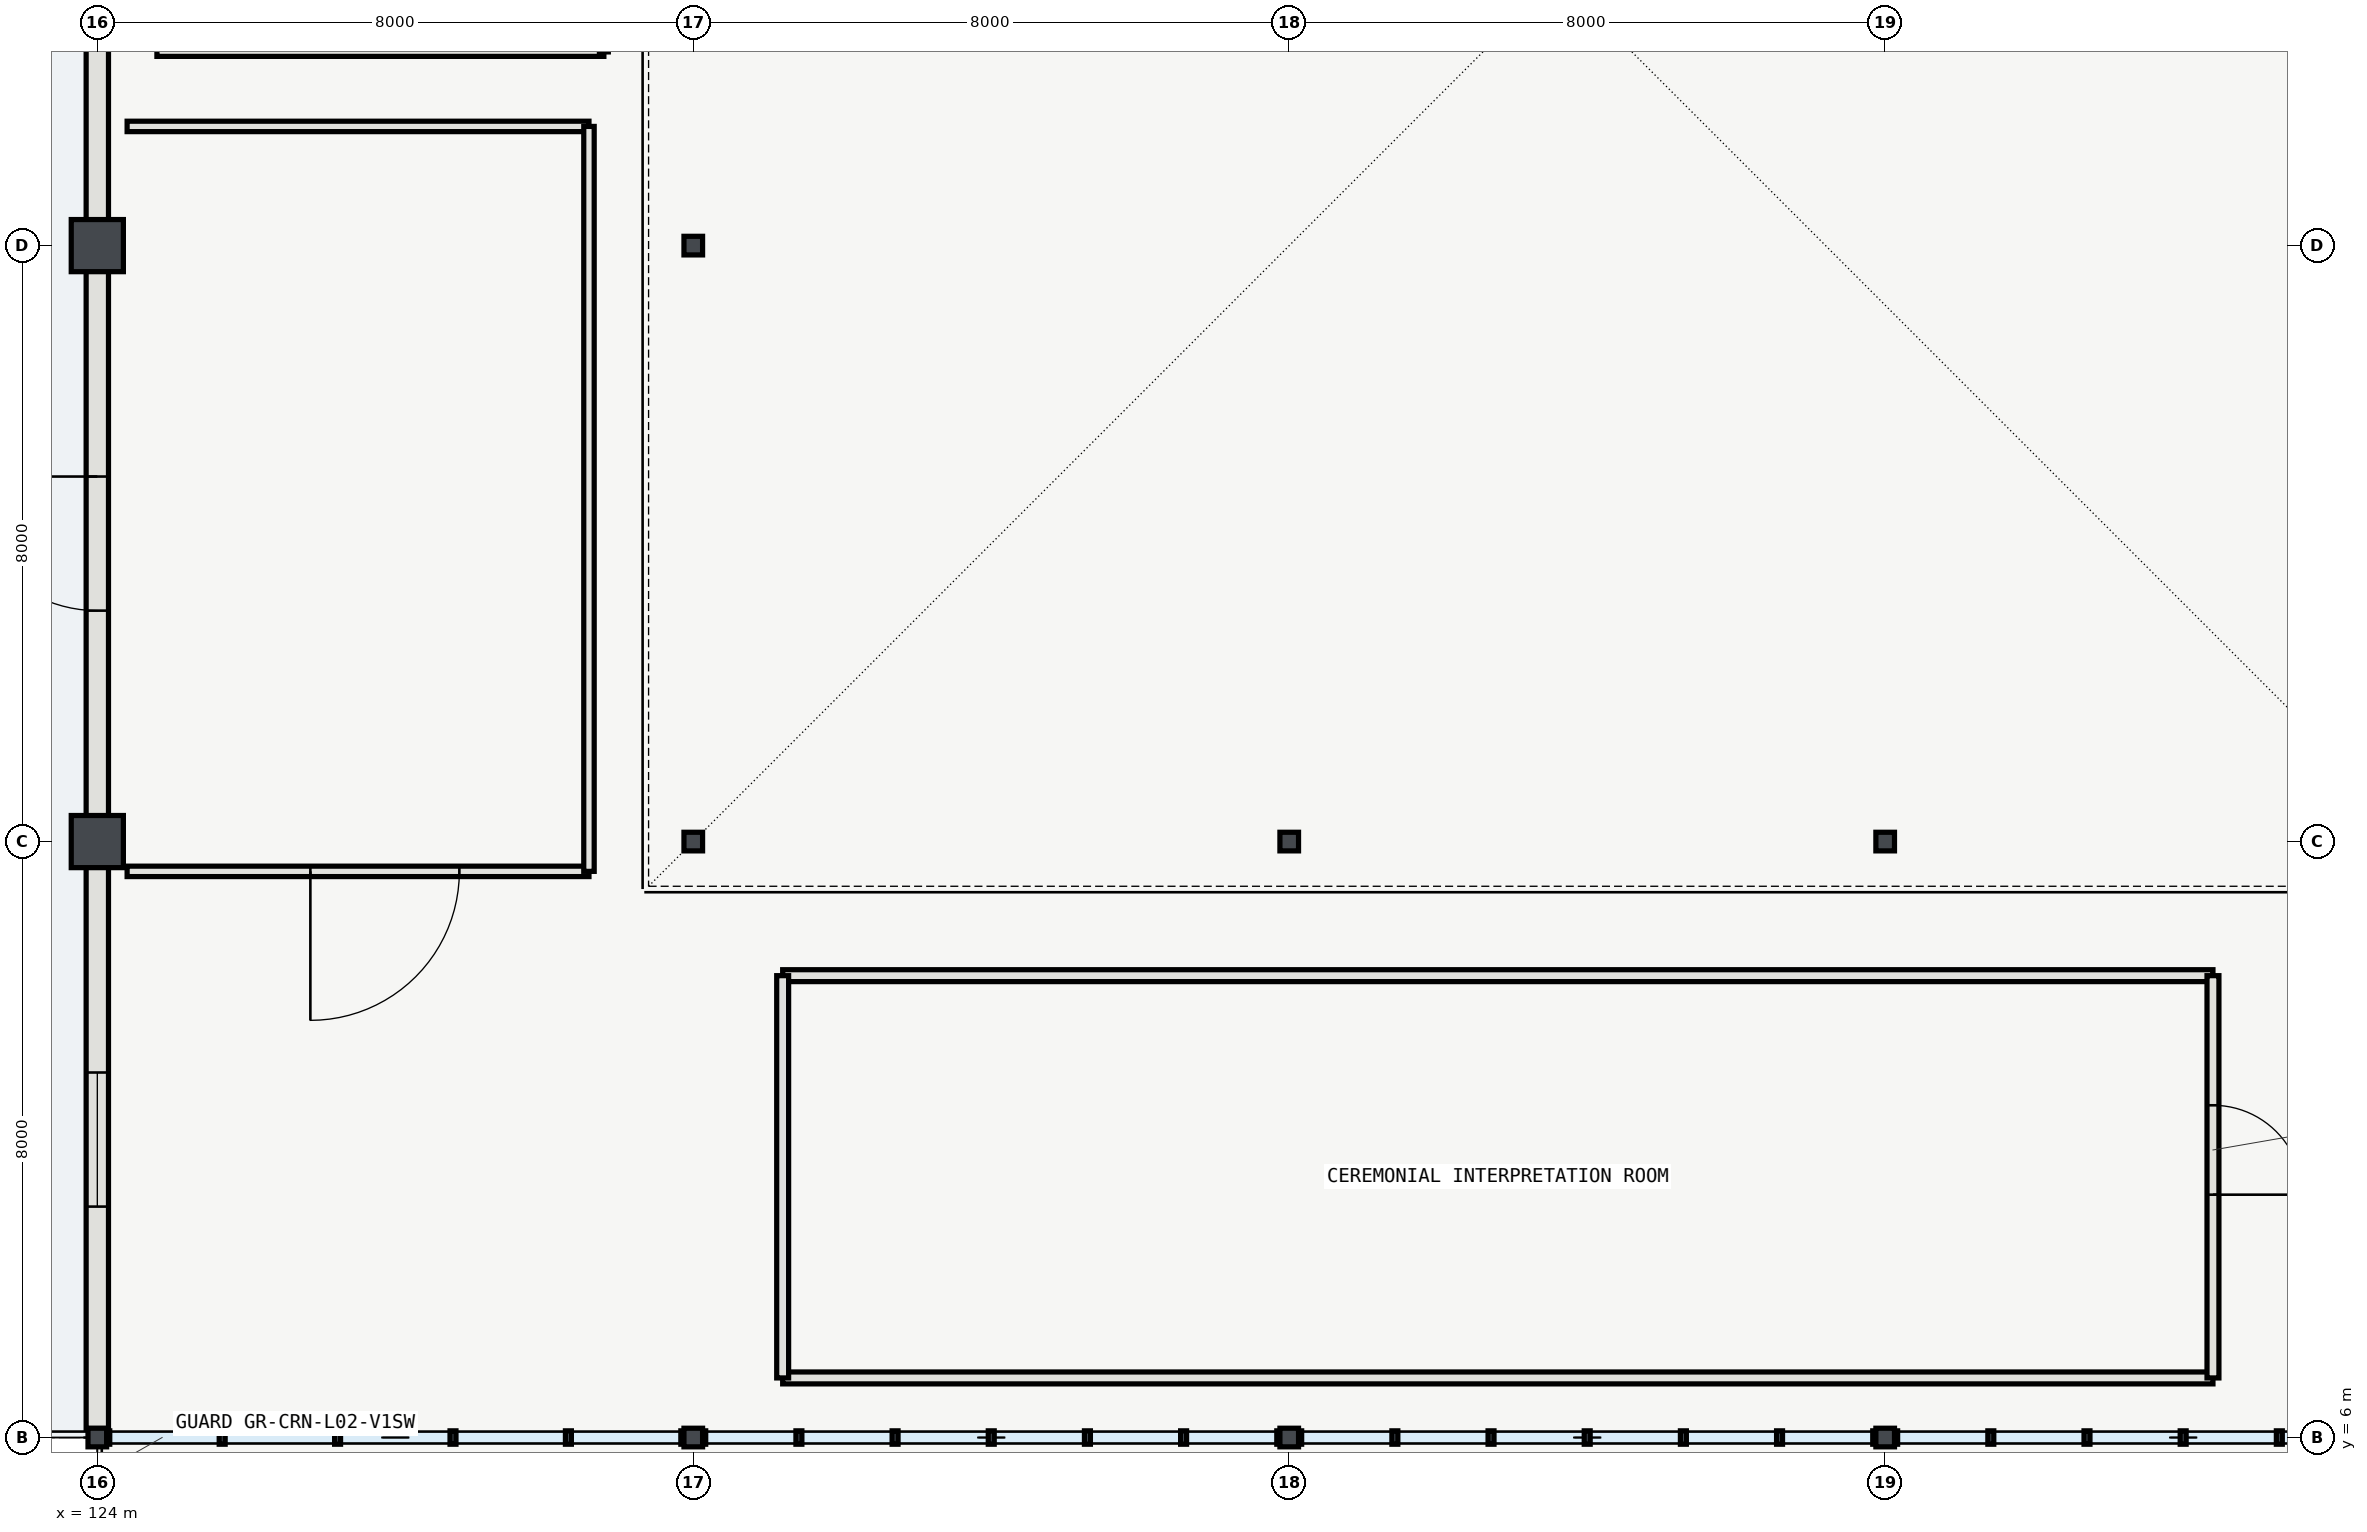
"""IFC4 building model, lengths in metres.
Left out: names, types, materials, properties, quantities, classifications, styles, units other than length and angle.
Written with IfcOpenShell. Run it as: python <this file> out.ifc"""

import sys

from ifc_helpers import new_model, si_unit, direction, frame, frame_2d, origin, origin_2d, place, context, subcontext, project, spatial, rectangle, i_section, extrude, element, fill, save


model = new_model("IFC4")
c1 = context("Model", 3, precision=1e-05, world=origin(), true_north=direction((0.0, 1.0)))
c2 = subcontext(c1, "Body", "Model", "MODEL_VIEW")
j1 = project(units=[si_unit("LENGTHUNIT", "METRE"), si_unit("PLANEANGLEUNIT", "RADIAN")], contexts=[c1])
p1 = place(None, origin())
s1 = spatial("IfcSite", under=j1, at=p1, CompositionType="ELEMENT")
p2 = place(p1, origin())
s2 = spatial("IfcBuilding", under=s1, at=p2, CompositionType="ELEMENT")
p3 = place(p2, frame((0.0, 0.0, 10.8)))
s3 = spatial("IfcBuildingStorey", under=s2, at=p3, CompositionType="ELEMENT", Elevation=10.8)
p4 = place(p3, frame((124.0, 6.0, 0.0), z_axis=(0.0, 0.0, 1.0), x_axis=(1.0, 0.0, 0.0)))
e1 = element("IfcColumn", 1, at=p4, inside=s3, PredefinedType="COLUMN", context=c2, shape_type="SweptSolid", body=[
    extrude(i_section(OverallWidth=0.25, OverallDepth=0.25, WebThickness=0.009, FlangeThickness=0.014, FilletRadius=0.016, at=origin_2d()), origin(), (0.0, 0.0, 1.0), 5.4),
])
for number, where, z_axis, x_axis in (
    (2, (124.0, 14.0, 0.0), (0.0, 0.0, 1.0), (1.0, 0.0, 0.0)),
    (3, (124.0, 22.0, 0.0), (0.0, 0.0, 1.0), (1.0, 0.0, 0.0)),
):
    element("IfcColumn", number, at=place(p3, frame(where, z_axis=z_axis, x_axis=x_axis)), inside=s3, PredefinedType="COLUMN", context=c2, shape_type="SweptSolid", body=[
        extrude(rectangle(XDim=0.7, YDim=0.7, at=origin_2d()), origin(), (0.0, 0.0, 1.0), 5.4),
    ])
for number, where, z_axis, x_axis in (
    (4, (132.0, 6.0, 0.0), (0.0, 0.0, 1.0), (1.0, 0.0, 0.0)),
    (5, (132.0, 14.0, 0.0), (0.0, 0.0, 1.0), (1.0, 0.0, 0.0)),
    (6, (132.0, 22.0, 0.0), (0.0, 0.0, 1.0), (1.0, 0.0, 0.0)),
    (7, (140.0, 6.0, 0.0), (0.0, 0.0, 1.0), (1.0, 0.0, 0.0)),
    (8, (140.0, 14.0, 0.0), (0.0, 0.0, 1.0), (1.0, 0.0, 0.0)),
    (9, (148.0, 6.0, 0.0), (0.0, 0.0, 1.0), (1.0, 0.0, 0.0)),
    (10, (148.0, 14.0, 0.0), (0.0, 0.0, 1.0), (1.0, 0.0, 0.0)),
):
    element("IfcColumn", number, at=place(p3, frame(where, z_axis=z_axis, x_axis=x_axis)), inside=s3, PredefinedType="COLUMN", context=c2, shape_type="SweptSolid", body=[
        extrude(i_section(OverallWidth=0.25, OverallDepth=0.25, WebThickness=0.009, FlangeThickness=0.014, FilletRadius=0.016, at=origin_2d()), origin(), (0.0, 0.0, 1.0), 5.4),
    ])
p5 = place(p3, frame((124.0, 13.654, 0.0), z_axis=(0.0, 0.0, 1.0), x_axis=(0.0, -1.0, 0.0)))
e11 = element("IfcWall", 11, at=p5, inside=s3, PredefinedType="SOLIDWALL", context=c2, shape_type="SweptSolid", body=[
    extrude(rectangle(XDim=7.533, YDim=0.3, at=frame_2d((3.767, 0.0))), origin(), (0.0, 0.0, 1.0), 4.603),
])
p6 = place(p5, frame((2.754, 0.0, 0.95)))
e12 = element("IfcOpeningElement", 12, at=p6, cuts=e11, PredefinedType="OPENING", context=c2, shape_type="SweptSolid", body=[
    extrude(rectangle(XDim=1.8, YDim=1.2, at=frame_2d((0.9, 0.6))), frame((0.0, 0.16, 0.0), z_axis=(0.0, -1.0, 0.0), x_axis=(1.0, 0.0, 0.0)), (0.0, 0.0, 1.0), 0.32),
])
p7 = place(p3, frame((124.0, 21.654, 0.0), z_axis=(0.0, 0.0, 1.0), x_axis=(0.0, -1.0, 0.0)))
e13 = element("IfcWall", 13, at=p7, inside=s3, PredefinedType="SOLIDWALL", context=c2, shape_type="SweptSolid", body=[
    extrude(rectangle(XDim=7.308, YDim=0.3, at=frame_2d((3.654, 0.0))), origin(), (0.0, 0.0, 1.0), 4.603),
])
p8 = place(p7, frame((2.754, 0.0, 0.0)))
e14 = element("IfcOpeningElement", 14, at=p8, cuts=e13, PredefinedType="OPENING", context=c2, shape_type="SweptSolid", body=[
    extrude(rectangle(XDim=1.8, YDim=2.2, at=frame_2d((0.9, 1.1))), frame((0.0, 0.16, 0.0), z_axis=(0.0, -1.0, 0.0), x_axis=(1.0, 0.0, 0.0)), (0.0, 0.0, 1.0), 0.32),
])
p9 = place(p3, frame((124.0, 29.879, 0.0), z_axis=(0.0, 0.0, 1.0), x_axis=(0.0, -1.0, 0.0)))
e15 = element("IfcWall", 15, at=p9, inside=s3, PredefinedType="SOLIDWALL", context=c2, shape_type="SweptSolid", body=[
    extrude(rectangle(XDim=7.533, YDim=0.3, at=frame_2d((3.767, 0.0))), origin(), (0.0, 0.0, 1.0), 4.603),
])
p10 = place(p9, frame((2.829, 0.0, 0.95)))
e16 = element("IfcOpeningElement", 16, at=p10, cuts=e15, PredefinedType="OPENING", context=c2, shape_type="SweptSolid", body=[
    extrude(rectangle(XDim=2.1, YDim=1.2, at=frame_2d((1.05, 0.6))), frame((0.0, 0.16, 0.0), z_axis=(0.0, -1.0, 0.0), x_axis=(1.0, 0.0, 0.0)), (0.0, 0.0, 1.0), 0.32),
])
for number, where, z_axis, x_axis in (
    (17, (133.2, 6.8, 0.0), (0.0, 0.0, 1.0), (1.0, 0.0, 0.0)),
    (18, (152.4, 12.2, 0.0), (0.0, 0.0, 1.0), (-1.0, 0.0, 0.0)),
):
    element("IfcWall", number, at=place(p3, frame(where, z_axis=z_axis, x_axis=x_axis)), inside=s3, PredefinedType="PARTITIONING", context=c2, shape_type="SweptSolid", body=[
        extrude(rectangle(XDim=19.2, YDim=0.16, at=frame_2d((9.6, 0.0))), origin(), (0.0, 0.0, 1.0), 5.12),
    ])
p11 = place(p3, frame((133.2, 12.2, 0.0), z_axis=(0.0, 0.0, 1.0), x_axis=(0.0, -1.0, 0.0)))
e19 = element("IfcWall", 19, at=p11, inside=s3, PredefinedType="PARTITIONING", context=c2, shape_type="SweptSolid", body=[
    extrude(rectangle(XDim=5.4, YDim=0.16, at=frame_2d((2.7, 0.0))), origin(), (0.0, 0.0, 1.0), 5.12),
])
p12 = place(p3, frame((152.4, 6.8, 0.0), z_axis=(0.0, 0.0, 1.0), x_axis=(0.0, 1.0, 0.0)))
e20 = element("IfcWall", 20, at=p12, inside=s3, PredefinedType="PARTITIONING", context=c2, shape_type="SweptSolid", body=[
    extrude(rectangle(XDim=5.4, YDim=0.16, at=frame_2d((2.7, 0.0))), origin(), (0.0, 0.0, 1.0), 5.12),
])
p13 = place(p12, frame((2.46, 0.0, 0.0)))
e21 = element("IfcOpeningElement", 21, at=p13, cuts=e20, PredefinedType="OPENING", context=c2, shape_type="SweptSolid", body=[
    extrude(rectangle(XDim=1.2, YDim=2.2, at=frame_2d((0.6, 1.1))), frame((0.0, 0.09, 0.0), z_axis=(0.0, -1.0, 0.0), x_axis=(1.0, 0.0, 0.0)), (0.0, 0.0, 1.0), 0.18),
])
p14 = place(p3, frame((124.8, 24.6, 0.0), z_axis=(0.0, 0.0, 1.0), x_axis=(1.0, 0.0, 0.0)))
e22 = element("IfcWall", 22, at=p14, inside=s3, PredefinedType="PARTITIONING", context=c2, shape_type="SweptSolid", body=[
    extrude(rectangle(XDim=6.0, YDim=0.12, at=frame_2d((3.0, 0.0))), origin(), (0.0, 0.0, 1.0), 5.12),
])
p15 = place(p3, frame((124.4, 13.6, 0.0), z_axis=(0.0, 0.0, 1.0), x_axis=(1.0, 0.0, 0.0)))
e23 = element("IfcWall", 23, at=p15, inside=s3, PredefinedType="PARTITIONING", context=c2, shape_type="SweptSolid", body=[
    extrude(rectangle(XDim=6.2, YDim=0.14, at=frame_2d((3.1, 0.0))), origin(), (0.0, 0.0, 1.0), 5.12),
])
p16 = place(p15, frame((2.46, 0.0, 0.0)))
e24 = element("IfcOpeningElement", 24, at=p16, cuts=e23, PredefinedType="OPENING", context=c2, shape_type="SweptSolid", body=[
    extrude(rectangle(XDim=2.0, YDim=2.4, at=frame_2d((1.0, 1.2))), frame((0.0, 0.08, 0.0), z_axis=(0.0, -1.0, 0.0), x_axis=(1.0, 0.0, 0.0)), (0.0, 0.0, 1.0), 0.16),
])
p17 = place(p3, frame((130.6, 23.6, 0.0), z_axis=(0.0, 0.0, 1.0), x_axis=(-1.0, 0.0, 0.0)))
e25 = element("IfcWall", 25, at=p17, inside=s3, PredefinedType="PARTITIONING", context=c2, shape_type="SweptSolid", body=[
    extrude(rectangle(XDim=6.2, YDim=0.14, at=frame_2d((3.1, 0.0))), origin(), (0.0, 0.0, 1.0), 5.12),
])
p18 = place(p3, frame((130.6, 13.6, 0.0), z_axis=(0.0, 0.0, 1.0), x_axis=(0.0, 1.0, 0.0)))
e26 = element("IfcWall", 26, at=p18, inside=s3, PredefinedType="PARTITIONING", context=c2, shape_type="SweptSolid", body=[
    extrude(rectangle(XDim=10.0, YDim=0.14, at=frame_2d((5.0, 0.0))), origin(), (0.0, 0.0, 1.0), 5.12),
])
p19 = place(p6, origin())
e27 = element("IfcWindow", 27, at=p19, inside=s3, PartitioningType="SINGLE_PANEL", PredefinedType="WINDOW", context=c2, shape_type="SweptSolid", body=[
    extrude(rectangle(XDim=1.8, YDim=1.2, at=frame_2d((0.9, 0.6))), frame((0.0, 0.03, 0.0), z_axis=(0.0, -1.0, 0.0), x_axis=(1.0, 0.0, 0.0)), (0.0, 0.0, 1.0), 0.06),
])
fill(e12, e27)
p20 = place(p8, origin())
e28 = element("IfcDoor", 28, at=p20, inside=s3, OperationType="DOUBLE_DOOR_SINGLE_SWING", PredefinedType="DOOR", context=c2, shape_type="SweptSolid", body=[
    extrude(rectangle(XDim=1.8, YDim=2.2, at=frame_2d((0.9, 1.1))), frame((0.0, 0.025, 0.0), z_axis=(0.0, -1.0, 0.0), x_axis=(1.0, 0.0, 0.0)), (0.0, 0.0, 1.0), 0.05),
])
fill(e14, e28)
p21 = place(p13, origin())
e29 = element("IfcDoor", 29, at=p21, inside=s3, OperationType="SINGLE_SWING_LEFT", PredefinedType="DOOR", context=c2, shape_type="SweptSolid", body=[
    extrude(rectangle(XDim=1.2, YDim=2.2, at=frame_2d((0.6, 1.1))), frame((0.0, 0.025, 0.0), z_axis=(0.0, -1.0, 0.0), x_axis=(1.0, 0.0, 0.0)), (0.0, 0.0, 1.0), 0.05),
])
fill(e21, e29)
p22 = place(p16, origin())
e30 = element("IfcDoor", 30, at=p22, inside=s3, OperationType="DOUBLE_DOOR_SINGLE_SWING", PredefinedType="DOOR", context=c2, shape_type="SweptSolid", body=[
    extrude(rectangle(XDim=2.0, YDim=2.4, at=frame_2d((1.0, 1.2))), frame((0.0, 0.025, 0.0), z_axis=(0.0, -1.0, 0.0), x_axis=(1.0, 0.0, 0.0)), (0.0, 0.0, 1.0), 0.05),
])
fill(e24, e30)
save(model, sys.argv[1])
